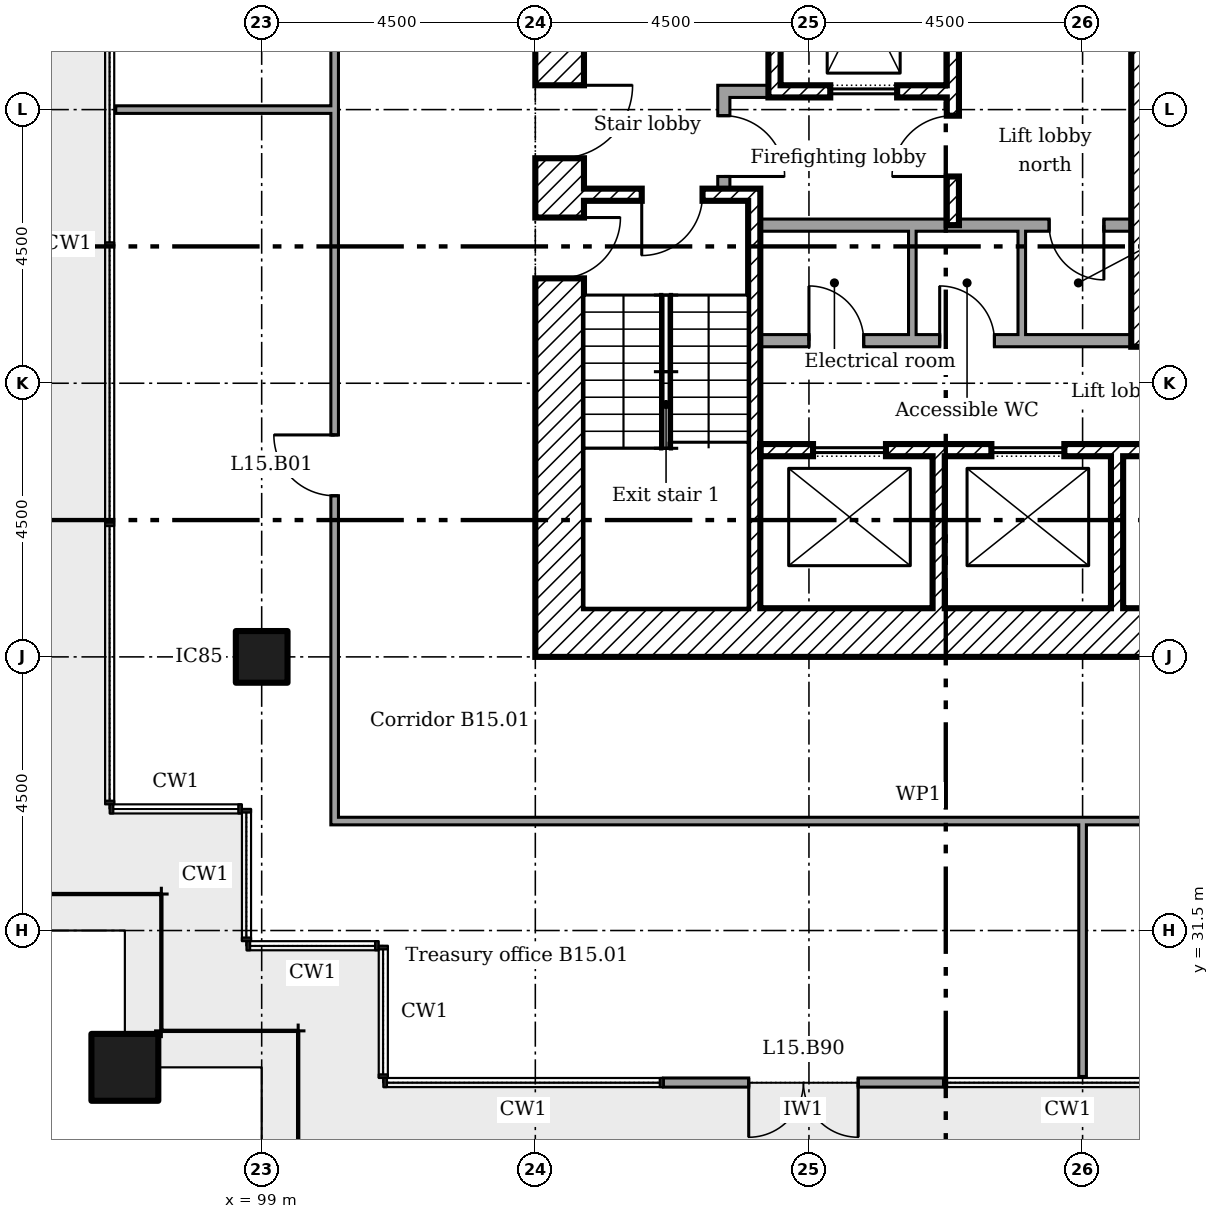
"""IFC4 building model, lengths in metres.
Left out: names, types, materials, properties, quantities, classifications, styles, units other than length and angle.
Written with IfcOpenShell. Run it as: python <this file> out.ifc"""

import sys

from ifc_helpers import new_model, si_unit, direction, frame, frame_2d, origin, origin_2d, place, context, subcontext, project, spatial, rectangle, extrude, element, fill, save


model = new_model("IFC4")
c1 = context("Model", 3, precision=1e-05, world=origin(), true_north=direction((0.0, 1.0)))
c2 = subcontext(c1, "Body", "Model", "MODEL_VIEW")
j1 = project(units=[si_unit("LENGTHUNIT", "METRE"), si_unit("PLANEANGLEUNIT", "RADIAN")], contexts=[c1])
p1 = place(None, origin())
s1 = spatial("IfcSite", under=j1, at=p1, CompositionType="ELEMENT")
p2 = place(p1, origin())
s2 = spatial("IfcBuilding", under=s1, at=p2, CompositionType="ELEMENT")
p3 = place(p2, frame((0.0, 0.0, 65.4)))
s3 = spatial("IfcBuildingStorey", under=s2, at=p3, CompositionType="ELEMENT", Elevation=65.4)
p4 = place(p3, frame((96.75, 29.25, 0.0)))
e1 = element("IfcColumn", 1, at=p4, inside=s3, PredefinedType="COLUMN", context=c2, shape_type="SweptSolid", body=[
    extrude(rectangle(XDim=1.1, YDim=1.1, at=origin_2d()), origin(), (0.0, 0.0, 1.0), 3.6),
])
p5 = place(p3, frame((99.0, 36.0, 0.0)))
e2 = element("IfcColumn", 2, at=p5, inside=s3, PredefinedType="COLUMN", context=c2, shape_type="SweptSolid", body=[
    extrude(rectangle(XDim=0.85, YDim=0.85, at=origin_2d()), origin(), (0.0, 0.0, 1.0), 3.6),
])
p6 = place(p3, frame((105.606, 29.0, 0.0)))
e3 = element("IfcWall", 3, at=p6, inside=s3, PredefinedType="SOLIDWALL", context=c2, shape_type="SweptSolid", body=[
    extrude(rectangle(XDim=4.606, YDim=0.15, at=frame_2d((2.303, 0.0))), origin(), (0.0, 0.0, 1.0), 3.45),
])
p7 = place(p6, frame((1.403, 0.0, 0.0)))
e4 = element("IfcOpeningElement", 4, at=p7, cuts=e3, PredefinedType="OPENING", context=c2, shape_type="SweptSolid", body=[
    extrude(rectangle(XDim=1.8, YDim=2.4, at=frame_2d((0.9, 1.2))), frame((0.0, 0.085, 0.0), z_axis=(0.0, -1.0, 0.0), x_axis=(1.0, 0.0, 0.0)), (0.0, 0.0, 1.0), 0.17),
])
p8 = place(p3, frame((104.3, 36.4, 0.0)))
e5 = element("IfcWall", 5, at=p8, inside=s3, PredefinedType="SHEAR", context=c2, shape_type="SweptSolid", body=[
    extrude(rectangle(XDim=11.9, YDim=0.8, at=frame_2d((5.95, 0.0))), origin(), (0.0, 0.0, 1.0), 3.35),
])
p9 = place(p3, frame((103.9, 36.0, 0.0), z_axis=(0.0, 0.0, 1.0), x_axis=(0.0, 1.0, 0.0)))
e6 = element("IfcWall", 6, at=p9, inside=s3, PredefinedType="SHEAR", context=c2, shape_type="SweptSolid", body=[
    extrude(rectangle(XDim=13.5, YDim=0.8, at=frame_2d((6.75, 0.0))), origin(), (0.0, 0.0, 1.0), 3.35),
])
p10 = place(p9, frame((8.2, 0.0, 0.0)))
e7 = element("IfcOpeningElement", 7, at=p10, cuts=e6, PredefinedType="OPENING", context=c2, shape_type="SweptSolid", body=[
    extrude(rectangle(XDim=1.2, YDim=2.1, at=frame_2d((0.6, 1.05))), frame((0.0, 0.41, 0.0), z_axis=(0.0, -1.0, 0.0), x_axis=(1.0, 0.0, 0.0)), (0.0, 0.0, 1.0), 0.82),
])
p11 = place(p9, frame((6.225, 0.0, 0.0)))
e8 = element("IfcOpeningElement", 8, at=p11, cuts=e6, PredefinedType="OPENING", context=c2, shape_type="SweptSolid", body=[
    extrude(rectangle(XDim=1.0, YDim=2.1, at=frame_2d((0.5, 1.05))), frame((0.0, 0.41, 0.0), z_axis=(0.0, -1.0, 0.0), x_axis=(1.0, 0.0, 0.0)), (0.0, 0.0, 1.0), 0.82),
])
p12 = place(p3, frame((107.433, 48.7, 0.0), z_axis=(0.0, 0.0, 1.0), x_axis=(0.0, -1.0, 0.0)))
e9 = element("IfcWall", 9, at=p12, inside=s3, PredefinedType="SHEAR", context=c2, shape_type="SweptSolid", body=[
    extrude(rectangle(XDim=3.5, YDim=0.2, at=frame_2d((1.75, 0.0))), origin(), (0.0, 0.0, 1.0), 3.35),
])
p13 = place(p3, frame((110.367, 48.7, 0.0), z_axis=(0.0, 0.0, 1.0), x_axis=(0.0, -1.0, 0.0)))
e10 = element("IfcWall", 10, at=p13, inside=s3, PredefinedType="SHEAR", context=c2, shape_type="SweptSolid", body=[
    extrude(rectangle(XDim=5.6, YDim=0.2, at=frame_2d((2.8, 0.0))), origin(), (0.0, 0.0, 1.0), 3.35),
])
p14 = place(p13, frame((3.8, 0.0, 0.0)))
e11 = element("IfcOpeningElement", 11, at=p14, cuts=e10, PredefinedType="OPENING", context=c2, shape_type="SweptSolid", body=[
    extrude(rectangle(XDim=1.0, YDim=2.1, at=frame_2d((0.5, 1.05))), frame((0.0, 0.11, 0.0), z_axis=(0.0, -1.0, 0.0), x_axis=(1.0, 0.0, 0.0)), (0.0, 0.0, 1.0), 0.22),
])
for number, where, z_axis, x_axis in (
    (12, (110.133, 36.8, 0.0), (0.0, 0.0, 1.0), (0.0, 1.0, 0.0)),
    (13, (113.067, 36.8, 0.0), (0.0, 0.0, 1.0), (0.0, 1.0, 0.0)),
):
    element("IfcWall", number, at=place(p3, frame(where, z_axis=z_axis, x_axis=x_axis)), inside=s3, PredefinedType="SHEAR", context=c2, shape_type="SweptSolid", body=[
        extrude(rectangle(XDim=2.5, YDim=0.2, at=frame_2d((1.25, 0.0))), origin(), (0.0, 0.0, 1.0), 3.35),
    ])
p15 = place(p3, frame((106.5, 45.3, 0.0)))
e14 = element("IfcWall", 14, at=p15, inside=s3, PredefinedType="PARTITIONING", context=c2, shape_type="SweptSolid", body=[
    extrude(rectangle(XDim=0.833, YDim=0.2, at=frame_2d((0.417, 0.0))), origin(), (0.0, 0.0, 1.0), 3.35),
])
p16 = place(p3, frame((106.6, 43.7, 0.0), z_axis=(0.0, 0.0, 1.0), x_axis=(0.0, 1.0, 0.0)))
e15 = element("IfcWall", 15, at=p16, inside=s3, PredefinedType="PARTITIONING", context=c2, shape_type="SweptSolid", body=[
    extrude(rectangle(XDim=1.5, YDim=0.2, at=frame_2d((0.75, 0.0))), origin(), (0.0, 0.0, 1.0), 3.35),
])
p17 = place(p16, frame((0.2, 0.0, 0.0)))
e16 = element("IfcOpeningElement", 16, at=p17, cuts=e15, PredefinedType="OPENING", context=c2, shape_type="SweptSolid", body=[
    extrude(rectangle(XDim=1.0, YDim=2.1, at=frame_2d((0.5, 1.05))), frame((0.0, 0.11, 0.0), z_axis=(0.0, -1.0, 0.0), x_axis=(1.0, 0.0, 0.0)), (0.0, 0.0, 1.0), 0.22),
])
p18 = place(p3, frame((107.533, 45.3, 0.0)))
e17 = element("IfcWall", 17, at=p18, inside=s3, PredefinedType="SHEAR", context=c2, shape_type="SweptSolid", body=[
    extrude(rectangle(XDim=2.733, YDim=0.2, at=frame_2d((1.367, 0.0))), origin(), (0.0, 0.0, 1.0), 3.35),
])
p19 = place(p18, frame((0.817, 0.0, 0.0)))
e18 = element("IfcOpeningElement", 18, at=p19, cuts=e17, PredefinedType="OPENING", context=c2, shape_type="SweptSolid", body=[
    extrude(rectangle(XDim=1.1, YDim=2.1, at=frame_2d((0.55, 1.05))), frame((0.0, 0.11, 0.0), z_axis=(0.0, -1.0, 0.0), x_axis=(1.0, 0.0, 0.0)), (0.0, 0.0, 1.0), 0.22),
])
p20 = place(p3, frame((107.2, 39.4, 0.0)))
e19 = element("IfcWall", 19, at=p20, inside=s3, PredefinedType="SHEAR", context=c2, shape_type="SweptSolid", body=[
    extrude(rectangle(XDim=9.0, YDim=0.2, at=frame_2d((4.5, 0.0))), origin(), (0.0, 0.0, 1.0), 3.35),
])
p21 = place(p20, frame((0.867, 0.0, 0.0)))
e20 = element("IfcOpeningElement", 20, at=p21, cuts=e19, PredefinedType="OPENING", context=c2, shape_type="SweptSolid", body=[
    extrude(rectangle(XDim=1.2, YDim=2.1, at=frame_2d((0.6, 1.05))), frame((0.0, 0.11, 0.0), z_axis=(0.0, -1.0, 0.0), x_axis=(1.0, 0.0, 0.0)), (0.0, 0.0, 1.0), 0.22),
])
p22 = place(p20, frame((3.8, 0.0, 0.0)))
e21 = element("IfcOpeningElement", 21, at=p22, cuts=e19, PredefinedType="OPENING", context=c2, shape_type="SweptSolid", body=[
    extrude(rectangle(XDim=1.2, YDim=2.1, at=frame_2d((0.6, 1.05))), frame((0.0, 0.11, 0.0), z_axis=(0.0, -1.0, 0.0), x_axis=(1.0, 0.0, 0.0)), (0.0, 0.0, 1.0), 0.22),
])
p23 = place(p20, frame((6.733, 0.0, 0.0)))
e22 = element("IfcOpeningElement", 22, at=p23, cuts=e19, PredefinedType="OPENING", context=c2, shape_type="SweptSolid", body=[
    extrude(rectangle(XDim=1.2, YDim=2.1, at=frame_2d((0.6, 1.05))), frame((0.0, 0.11, 0.0), z_axis=(0.0, -1.0, 0.0), x_axis=(1.0, 0.0, 0.0)), (0.0, 0.0, 1.0), 0.22),
])
p24 = place(p3, frame((107.1, 36.8, 0.0), z_axis=(0.0, 0.0, 1.0), x_axis=(0.0, 1.0, 0.0)))
e23 = element("IfcWall", 23, at=p24, inside=s3, PredefinedType="SHEAR", context=c2, shape_type="SweptSolid", body=[
    extrude(rectangle(XDim=6.9, YDim=0.2, at=frame_2d((3.45, 0.0))), origin(), (0.0, 0.0, 1.0), 3.35),
])
p25 = place(p3, frame((104.3, 43.6, 0.0)))
e24 = element("IfcWall", 24, at=p25, inside=s3, PredefinedType="SHEAR", context=c2, shape_type="SweptSolid", body=[
    extrude(rectangle(XDim=2.7, YDim=0.2, at=frame_2d((1.35, 0.0))), origin(), (0.0, 0.0, 1.0), 3.35),
])
p26 = place(p25, frame((0.95, 0.0, 0.0)))
e25 = element("IfcOpeningElement", 25, at=p26, cuts=e24, PredefinedType="OPENING", context=c2, shape_type="SweptSolid", body=[
    extrude(rectangle(XDim=1.0, YDim=2.1, at=frame_2d((0.5, 1.05))), frame((0.0, 0.11, 0.0), z_axis=(0.0, -1.0, 0.0), x_axis=(1.0, 0.0, 0.0)), (0.0, 0.0, 1.0), 0.22),
])
p27 = place(p3, frame((113.4, 41.1, 0.0), z_axis=(0.0, 0.0, 1.0), x_axis=(0.0, 1.0, 0.0)))
e26 = element("IfcWall", 26, at=p27, inside=s3, PredefinedType="SHEAR", context=c2, shape_type="SweptSolid", body=[
    extrude(rectangle(XDim=7.6, YDim=0.2, at=frame_2d((3.8, 0.0))), origin(), (0.0, 0.0, 1.0), 3.35),
])
p28 = place(p3, frame((107.2, 43.1, 0.0)))
e27 = element("IfcWall", 27, at=p28, inside=s3, PredefinedType="PARTITIONING", context=c2, shape_type="SweptSolid", body=[
    extrude(rectangle(XDim=6.1, YDim=0.2, at=frame_2d((3.05, 0.0))), origin(), (0.0, 0.0, 1.0), 3.35),
])
p29 = place(p28, frame((4.75, 0.0, 0.0)))
e28 = element("IfcOpeningElement", 28, at=p29, cuts=e27, PredefinedType="OPENING", context=c2, shape_type="SweptSolid", body=[
    extrude(rectangle(XDim=0.9, YDim=2.1, at=frame_2d((0.45, 1.05))), frame((0.0, 0.11, 0.0), z_axis=(0.0, -1.0, 0.0), x_axis=(1.0, 0.0, 0.0)), (0.0, 0.0, 1.0), 0.22),
])
p30 = place(p3, frame((107.2, 41.2, 0.0)))
e29 = element("IfcWall", 29, at=p30, inside=s3, PredefinedType="PARTITIONING", context=c2, shape_type="SweptSolid", body=[
    extrude(rectangle(XDim=6.1, YDim=0.2, at=frame_2d((3.05, 0.0))), origin(), (0.0, 0.0, 1.0), 3.35),
])
p31 = place(p30, frame((0.8, 0.0, 0.0)))
e30 = element("IfcOpeningElement", 30, at=p31, cuts=e29, PredefinedType="OPENING", context=c2, shape_type="SweptSolid", body=[
    extrude(rectangle(XDim=0.9, YDim=2.1, at=frame_2d((0.45, 1.05))), frame((0.0, 0.11, 0.0), z_axis=(0.0, -1.0, 0.0), x_axis=(1.0, 0.0, 0.0)), (0.0, 0.0, 1.0), 0.22),
])
p32 = place(p30, frame((2.95, 0.0, 0.0)))
e31 = element("IfcOpeningElement", 31, at=p32, cuts=e29, PredefinedType="OPENING", context=c2, shape_type="SweptSolid", body=[
    extrude(rectangle(XDim=0.9, YDim=2.1, at=frame_2d((0.45, 1.05))), frame((0.0, 0.11, 0.0), z_axis=(0.0, -1.0, 0.0), x_axis=(1.0, 0.0, 0.0)), (0.0, 0.0, 1.0), 0.22),
])
for number, where, z_axis, x_axis in (
    (32, (109.7, 41.3, 0.0), (0.0, 0.0, 1.0), (0.0, 1.0, 0.0)),
    (33, (111.5, 41.3, 0.0), (0.0, 0.0, 1.0), (0.0, 1.0, 0.0)),
):
    element("IfcWall", number, at=place(p3, frame(where, z_axis=z_axis, x_axis=x_axis)), inside=s3, PredefinedType="PARTITIONING", context=c2, shape_type="SweptSolid", body=[
        extrude(rectangle(XDim=1.7, YDim=0.125, at=frame_2d((0.85, 0.0))), origin(), (0.0, 0.0, 1.0), 3.35),
    ])
p33 = place(p3, frame((100.137, 33.3, 0.0)))
e34 = element("IfcWall", 34, at=p33, inside=s3, PredefinedType="PARTITIONING", context=c2, shape_type="SweptSolid", body=[
    extrude(rectangle(XDim=19.325, YDim=0.125, at=frame_2d((9.663, 0.0))), origin(), (0.0, 0.0, 1.0), 3.45),
])
p34 = place(p3, frame((96.6, 45.0, 0.0)))
e35 = element("IfcWall", 35, at=p34, inside=s3, PredefinedType="PARTITIONING", context=c2, shape_type="SweptSolid", body=[
    extrude(rectangle(XDim=3.6, YDim=0.125, at=frame_2d((1.8, 0.0))), origin(), (0.0, 0.0, 1.0), 2.851),
])
p35 = place(p3, frame((100.2, 33.363, 0.0), z_axis=(0.0, 0.0, 1.0), x_axis=(0.0, 1.0, 0.0)))
e36 = element("IfcWall", 36, at=p35, inside=s3, PredefinedType="PARTITIONING", context=c2, shape_type="SweptSolid", body=[
    extrude(rectangle(XDim=17.875, YDim=0.125, at=frame_2d((8.938, 0.0))), origin(), (0.0, 0.0, 1.0), 3.45),
])
p36 = place(p35, frame((5.288, 0.0, 0.0)))
e37 = element("IfcOpeningElement", 37, at=p36, cuts=e36, PredefinedType="OPENING", context=c2, shape_type="SweptSolid", body=[
    extrude(rectangle(XDim=1.0, YDim=2.1, at=frame_2d((0.5, 1.05))), frame((0.0, 0.073, 0.0), z_axis=(0.0, -1.0, 0.0), x_axis=(1.0, 0.0, 0.0)), (0.0, 0.0, 1.0), 0.145),
])
p37 = place(p3, frame((112.5, 29.1, 0.0), z_axis=(0.0, 0.0, 1.0), x_axis=(0.0, 1.0, 0.0)))
e38 = element("IfcWall", 38, at=p37, inside=s3, PredefinedType="PARTITIONING", context=c2, shape_type="SweptSolid", body=[
    extrude(rectangle(XDim=4.2, YDim=0.125, at=frame_2d((2.1, 0.0))), origin(), (0.0, 0.0, 1.0), 2.851),
])
p38 = place(p7, frame((1.8, 0.0, 0.0), x_axis=(-1.0, 0.0, 0.0)))
e39 = element("IfcDoor", 39, at=p38, inside=s3, OperationType="DOUBLE_DOOR_DOUBLE_SWING", PredefinedType="NOTDEFINED", context=c2, shape_type="SweptSolid", body=[
    extrude(rectangle(XDim=1.8, YDim=2.4, at=frame_2d((0.9, 1.2))), frame((0.0, 0.025, 0.0), z_axis=(0.0, -1.0, 0.0), x_axis=(1.0, 0.0, 0.0)), (0.0, 0.0, 1.0), 0.05),
])
fill(e4, e39)
p39 = place(p10, frame((1.2, 0.0, 0.0), x_axis=(-1.0, 0.0, 0.0)))
e40 = element("IfcDoor", 40, at=p39, inside=s3, OperationType="SINGLE_SWING_RIGHT", PredefinedType="DOOR", context=c2, shape_type="SweptSolid", body=[
    extrude(rectangle(XDim=1.2, YDim=2.1, at=frame_2d((0.6, 1.05))), frame((0.0, 0.025, 0.0), z_axis=(0.0, -1.0, 0.0), x_axis=(1.0, 0.0, 0.0)), (0.0, 0.0, 1.0), 0.05),
])
fill(e7, e40)
p40 = place(p26, frame((1.0, 0.0, 0.0), x_axis=(-1.0, 0.0, 0.0)))
e41 = element("IfcDoor", 41, at=p40, inside=s3, OperationType="SINGLE_SWING_LEFT", PredefinedType="DOOR", context=c2, shape_type="SweptSolid", body=[
    extrude(rectangle(XDim=1.0, YDim=2.1, at=frame_2d((0.5, 1.05))), frame((0.0, 0.025, 0.0), z_axis=(0.0, -1.0, 0.0), x_axis=(1.0, 0.0, 0.0)), (0.0, 0.0, 1.0), 0.05),
])
fill(e25, e41)
p41 = place(p11, frame((1.0, 0.0, 0.0), x_axis=(-1.0, 0.0, 0.0)))
e42 = element("IfcDoor", 42, at=p41, inside=s3, OperationType="SINGLE_SWING_RIGHT", PredefinedType="DOOR", context=c2, shape_type="SweptSolid", body=[
    extrude(rectangle(XDim=1.0, YDim=2.1, at=frame_2d((0.5, 1.05))), frame((0.0, 0.025, 0.0), z_axis=(0.0, -1.0, 0.0), x_axis=(1.0, 0.0, 0.0)), (0.0, 0.0, 1.0), 0.05),
])
fill(e8, e42)
p42 = place(p14, frame((1.0, 0.0, 0.0), x_axis=(-1.0, 0.0, 0.0)))
e43 = element("IfcDoor", 43, at=p42, inside=s3, OperationType="SINGLE_SWING_RIGHT", PredefinedType="DOOR", context=c2, shape_type="SweptSolid", body=[
    extrude(rectangle(XDim=1.0, YDim=2.1, at=frame_2d((0.5, 1.05))), frame((0.0, 0.025, 0.0), z_axis=(0.0, -1.0, 0.0), x_axis=(1.0, 0.0, 0.0)), (0.0, 0.0, 1.0), 0.05),
])
fill(e11, e43)
p43 = place(p17, frame((1.0, 0.0, 0.0), x_axis=(-1.0, 0.0, 0.0)))
e44 = element("IfcDoor", 44, at=p43, inside=s3, OperationType="SINGLE_SWING_LEFT", PredefinedType="DOOR", context=c2, shape_type="SweptSolid", body=[
    extrude(rectangle(XDim=1.0, YDim=2.1, at=frame_2d((0.5, 1.05))), frame((0.0, 0.025, 0.0), z_axis=(0.0, -1.0, 0.0), x_axis=(1.0, 0.0, 0.0)), (0.0, 0.0, 1.0), 0.05),
])
fill(e16, e44)
p44 = place(p31, origin())
e45 = element("IfcDoor", 45, at=p44, inside=s3, OperationType="SINGLE_SWING_RIGHT", PredefinedType="DOOR", context=c2, shape_type="SweptSolid", body=[
    extrude(rectangle(XDim=0.9, YDim=2.1, at=frame_2d((0.45, 1.05))), frame((0.0, 0.025, 0.0), z_axis=(0.0, -1.0, 0.0), x_axis=(1.0, 0.0, 0.0)), (0.0, 0.0, 1.0), 0.05),
])
fill(e30, e45)
p45 = place(p32, origin())
e46 = element("IfcDoor", 46, at=p45, inside=s3, OperationType="SINGLE_SWING_RIGHT", PredefinedType="DOOR", context=c2, shape_type="SweptSolid", body=[
    extrude(rectangle(XDim=0.9, YDim=2.1, at=frame_2d((0.45, 1.05))), frame((0.0, 0.025, 0.0), z_axis=(0.0, -1.0, 0.0), x_axis=(1.0, 0.0, 0.0)), (0.0, 0.0, 1.0), 0.05),
])
fill(e31, e46)
p46 = place(p29, frame((0.9, 0.0, 0.0), x_axis=(-1.0, 0.0, 0.0)))
e47 = element("IfcDoor", 47, at=p46, inside=s3, OperationType="SINGLE_SWING_RIGHT", PredefinedType="DOOR", context=c2, shape_type="SweptSolid", body=[
    extrude(rectangle(XDim=0.9, YDim=2.1, at=frame_2d((0.45, 1.05))), frame((0.0, 0.025, 0.0), z_axis=(0.0, -1.0, 0.0), x_axis=(1.0, 0.0, 0.0)), (0.0, 0.0, 1.0), 0.05),
])
fill(e28, e47)
p47 = place(p19, origin())
e48 = element("IfcDoor", 48, at=p47, inside=s3, OperationType="SLIDING_TO_LEFT", PredefinedType="DOOR", context=c2, shape_type="SweptSolid", body=[
    extrude(rectangle(XDim=1.1, YDim=2.1, at=frame_2d((0.55, 1.05))), frame((0.0, 0.025, 0.0), z_axis=(0.0, -1.0, 0.0), x_axis=(1.0, 0.0, 0.0)), (0.0, 0.0, 1.0), 0.05),
])
fill(e18, e48)
p48 = place(p21, origin())
e49 = element("IfcDoor", 49, at=p48, inside=s3, OperationType="SLIDING_TO_LEFT", PredefinedType="DOOR", context=c2, shape_type="SweptSolid", body=[
    extrude(rectangle(XDim=1.2, YDim=2.1, at=frame_2d((0.6, 1.05))), frame((0.0, 0.025, 0.0), z_axis=(0.0, -1.0, 0.0), x_axis=(1.0, 0.0, 0.0)), (0.0, 0.0, 1.0), 0.05),
])
fill(e20, e49)
p49 = place(p22, origin())
e50 = element("IfcDoor", 50, at=p49, inside=s3, OperationType="SLIDING_TO_LEFT", PredefinedType="DOOR", context=c2, shape_type="SweptSolid", body=[
    extrude(rectangle(XDim=1.2, YDim=2.1, at=frame_2d((0.6, 1.05))), frame((0.0, 0.025, 0.0), z_axis=(0.0, -1.0, 0.0), x_axis=(1.0, 0.0, 0.0)), (0.0, 0.0, 1.0), 0.05),
])
fill(e21, e50)
p50 = place(p36, origin())
e51 = element("IfcDoor", 51, at=p50, inside=s3, OperationType="SINGLE_SWING_LEFT", PredefinedType="DOOR", context=c2, shape_type="SweptSolid", body=[
    extrude(rectangle(XDim=1.0, YDim=2.1, at=frame_2d((0.5, 1.05))), frame((0.0, 0.025, 0.0), z_axis=(0.0, -1.0, 0.0), x_axis=(1.0, 0.0, 0.0)), (0.0, 0.0, 1.0), 0.05),
])
fill(e37, e51)
save(model, sys.argv[1])
